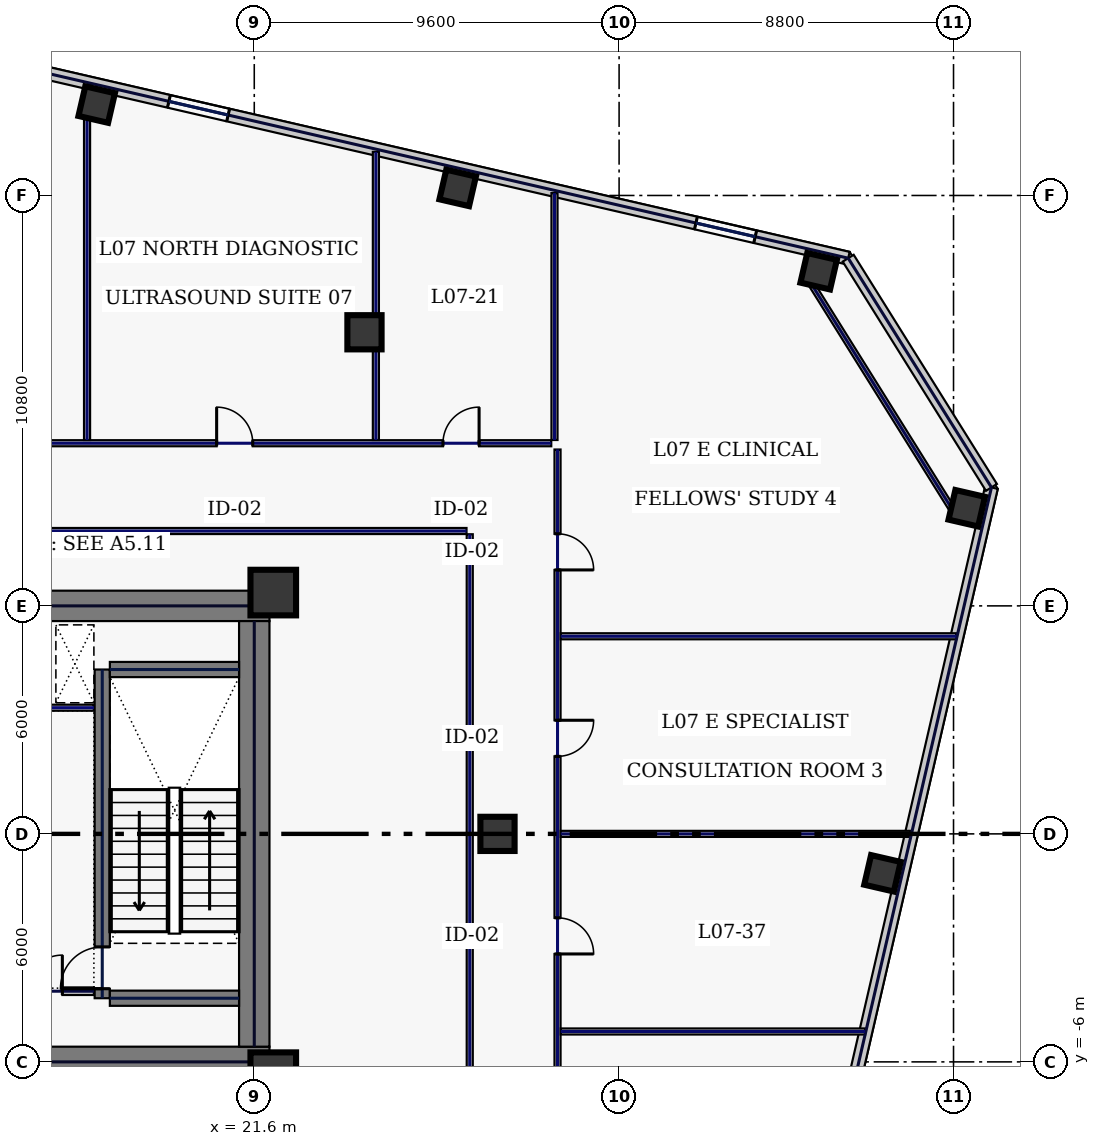
"""IFC4 building model, lengths in metres.
Left out: names, types, materials, properties, quantities, classifications, styles, units other than length and angle.
Written with IfcOpenShell. Run it as: python <this file> out.ifc"""

import sys

from ifc_helpers import new_model, si_unit, direction, frame, frame_2d, origin, origin_2d, place, context, subcontext, project, spatial, rectangle, hollow_rectangle, extrude, element, fill, save


model = new_model("IFC4")
c1 = context("Model", 3, precision=1e-05, world=origin(), true_north=direction((0.0, 1.0)))
c2 = subcontext(c1, "Body", "Model", "MODEL_VIEW")
j1 = project(units=[si_unit("LENGTHUNIT", "METRE"), si_unit("PLANEANGLEUNIT", "RADIAN")], contexts=[c1])
p1 = place(None, origin())
s1 = spatial("IfcSite", under=j1, at=p1, CompositionType="ELEMENT")
p2 = place(p1, origin())
s2 = spatial("IfcBuilding", under=s1, at=p2, CompositionType="ELEMENT")
p3 = place(p2, frame((0.0, 0.0, 39.4)))
s3 = spatial("IfcBuildingStorey", under=s2, at=p3, CompositionType="ELEMENT", Elevation=39.4)
for number, where, z_axis, x_axis in (
    (1, (10.4, 6.0, 0.0), (0.0, 0.0, 1.0), (1.0, 0.0, 0.0)),
    (2, (10.4, -6.0, 0.0), (0.0, 0.0, 1.0), (1.0, 0.0, 0.0)),
):
    element("IfcWall", number, at=place(p3, frame(where, z_axis=z_axis, x_axis=x_axis)), inside=s3, PredefinedType="SHEAR", context=c2, shape_type="SweptSolid", body=[
        extrude(rectangle(XDim=11.6, YDim=0.8, at=frame_2d((5.8, 0.0))), origin(), (0.0, 0.0, 1.0), 3.74),
    ])
p4 = place(p3, frame((21.6, -5.6, 0.0), z_axis=(0.0, 0.0, 1.0), x_axis=(0.0, 1.0, 0.0)))
e3 = element("IfcWall", 3, at=p4, inside=s3, PredefinedType="SHEAR", context=c2, shape_type="SweptSolid", body=[
    extrude(rectangle(XDim=11.2, YDim=0.8, at=frame_2d((5.6, 0.0))), origin(), (0.0, 0.0, 1.0), 3.74),
])
p5 = place(p3, frame((17.6, -4.325, 0.0), z_axis=(0.0, 0.0, 1.0), x_axis=(0.0, 1.0, 0.0)))
e4 = element("IfcWall", 4, at=p5, inside=s3, PredefinedType="SHEAR", context=c2, shape_type="SweptSolid", body=[
    extrude(rectangle(XDim=8.65, YDim=0.4, at=frame_2d((4.325, 0.0))), origin(), (0.0, 0.0, 1.0), 3.74),
])
p6 = place(p5, frame((0.25, 0.0, 0.0)))
e5 = element("IfcOpeningElement", 5, at=p6, cuts=e4, PredefinedType="OPENING", context=c2, shape_type="SweptSolid", body=[
    extrude(rectangle(XDim=1.1, YDim=2.2, at=frame_2d((0.55, 1.1))), frame((0.0, 0.21, 0.0), z_axis=(0.0, -1.0, 0.0), x_axis=(1.0, 0.0, 0.0)), (0.0, 0.0, 1.0), 0.42),
])
for number, where, z_axis, x_axis in (
    (6, (17.8, -4.325, 0.0), (0.0, 0.0, 1.0), (1.0, 0.0, 0.0)),
    (7, (17.8, 4.325, 0.0), (0.0, 0.0, 1.0), (1.0, 0.0, 0.0)),
):
    element("IfcWall", number, at=place(p3, frame(where, z_axis=z_axis, x_axis=x_axis)), inside=s3, PredefinedType="SHEAR", context=c2, shape_type="SweptSolid", body=[
        extrude(rectangle(XDim=3.4, YDim=0.4, at=frame_2d((1.7, 0.0))), origin(), (0.0, 0.0, 1.0), 3.74),
    ])
for number, where, z_axis, x_axis in (
    (8, (22.1, -6.35, 0.0), (0.0, 0.0, 1.0), (1.0, 0.0, 0.0)),
    (9, (22.1, 6.35, 0.0), (0.0, 0.0, 1.0), (1.0, 0.0, 0.0)),
):
    element("IfcColumn", number, at=place(p3, frame(where, z_axis=z_axis, x_axis=x_axis)), inside=s3, PredefinedType="COLUMN", context=c2, shape_type="SweptSolid", body=[
        extrude(hollow_rectangle(XDim=1.2, YDim=1.2, WallThickness=0.05, at=origin_2d()), origin(), (0.0, 0.0, 1.0), 3.74),
    ])
for number, where, z_axis, x_axis in (
    (10, (24.5, 13.2, 0.0), (0.0, 0.0, 1.0), (1.0, 0.0, 0.0)),
    (11, (28.0, 0.0, 0.0), (0.0, 0.0, 1.0), (1.0, 0.0, 0.0)),
):
    element("IfcColumn", number, at=place(p3, frame(where, z_axis=z_axis, x_axis=x_axis)), inside=s3, PredefinedType="COLUMN", context=c2, shape_type="SweptSolid", body=[
        extrude(hollow_rectangle(XDim=0.9, YDim=0.9, WallThickness=0.04, at=origin_2d()), origin(), (0.0, 0.0, 1.0), 3.74),
    ])
for number, where, z_axis, x_axis in (
    (12, (36.451, 14.806, 0.0), (0.0, 0.0, 1.0), (0.974, -0.225, 0.0)),
    (13, (26.952, 16.999, 0.0), (0.0, 0.0, 1.0), (0.974, -0.225, 0.0)),
    (14, (17.454, 19.192, 0.0), (0.0, 0.0, 1.0), (0.974, -0.225, 0.0)),
    (15, (38.13, -1.038, 0.0), (0.0, 0.0, 1.0), (0.974, -0.225, 0.0)),
    (16, (40.348, 8.57, 0.0), (0.0, 0.0, 1.0), (0.974, -0.225, 0.0)),
):
    element("IfcColumn", number, at=place(p3, frame(where, z_axis=z_axis, x_axis=x_axis)), inside=s3, PredefinedType="COLUMN", context=c2, shape_type="SweptSolid", body=[
        extrude(hollow_rectangle(XDim=0.8, YDim=0.8, WallThickness=0.036, at=origin_2d()), origin(), (0.0, 0.0, 1.0), 3.74),
    ])
p7 = place(p3, frame((37.229, 15.15, 0.0), z_axis=(0.0, 0.0, 1.0), x_axis=(-0.97436993772, 0.224951604723, 0.0)))
e17 = element("IfcWall", 17, at=p7, inside=s3, PredefinedType="STANDARD", context=c2, shape_type="SweptSolid", body=[
    extrude(rectangle(XDim=22.651, YDim=0.34, at=frame_2d((11.326, 0.0))), origin(), (0.0, 0.0, 1.0), 3.74),
])
p8 = place(p7, frame((16.745, 0.0, 0.22)))
e18 = element("IfcOpeningElement", 18, at=p8, cuts=e17, PredefinedType="OPENING", context=c2, shape_type="SweptSolid", body=[
    extrude(rectangle(XDim=1.6, YDim=1.2, at=frame_2d((0.8, 0.6))), frame((0.0, 0.18, 0.0), z_axis=(0.0, -1.0, 0.0), x_axis=(1.0, 0.0, 0.0)), (0.0, 0.0, 1.0), 0.36),
])
p9 = place(p7, frame((2.512, 0.0, 0.22)))
e19 = element("IfcOpeningElement", 19, at=p9, cuts=e17, PredefinedType="OPENING", context=c2, shape_type="SweptSolid", body=[
    extrude(rectangle(XDim=1.6, YDim=1.2, at=frame_2d((0.8, 0.6))), frame((0.0, 0.18, 0.0), z_axis=(0.0, -1.0, 0.0), x_axis=(1.0, 0.0, 0.0)), (0.0, 0.0, 1.0), 0.36),
])
p10 = place(p3, frame((31.82, -30.637, 0.0), z_axis=(0.0, 0.0, 1.0), x_axis=(0.224949969076, 0.974370315338, 0.0)))
e20 = element("IfcWall", 20, at=p10, inside=s3, PredefinedType="STANDARD", context=c2, shape_type="SweptSolid", body=[
    extrude(rectangle(XDim=40.8, YDim=0.34, at=frame_2d((20.4, 0.0))), origin(), (0.0, 0.0, 1.0), 3.74),
])
p11 = place(p10, frame((4.3, 0.0, 0.22)))
e21 = element("IfcOpeningElement", 21, at=p11, cuts=e20, PredefinedType="OPENING", context=c2, shape_type="SweptSolid", body=[
    extrude(rectangle(XDim=1.6, YDim=1.2, at=frame_2d((0.8, 0.6))), frame((0.0, 0.18, 0.0), z_axis=(0.0, -1.0, 0.0), x_axis=(1.0, 0.0, 0.0)), (0.0, 0.0, 1.0), 0.36),
])
p12 = place(p10, frame((14.5, 0.0, 0.22)))
e22 = element("IfcOpeningElement", 22, at=p12, cuts=e20, PredefinedType="OPENING", context=c2, shape_type="SweptSolid", body=[
    extrude(rectangle(XDim=1.6, YDim=1.2, at=frame_2d((0.8, 0.6))), frame((0.0, 0.18, 0.0), z_axis=(0.0, -1.0, 0.0), x_axis=(1.0, 0.0, 0.0)), (0.0, 0.0, 1.0), 0.36),
])
p13 = place(p3, frame((40.998, 9.117, 0.0), z_axis=(0.0, 0.0, 1.0), x_axis=(-0.529921811158, 0.848046504656, 0.0)))
e23 = element("IfcWall", 23, at=p13, inside=s3, PredefinedType="STANDARD", context=c2, shape_type="SweptSolid", body=[
    extrude(rectangle(XDim=7.113, YDim=0.34, at=frame_2d((3.557, 0.0))), origin(), (0.0, 0.0, 1.0), 3.74),
])
p14 = place(p3, frame((15.725, 3.32, 0.0), z_axis=(0.0, 0.0, 1.0), x_axis=(1.0, 0.0, 0.0)))
e24 = element("IfcWall", 24, at=p14, inside=s3, PredefinedType="PARTITIONING", context=c2, shape_type="SweptSolid", body=[
    extrude(rectangle(XDim=1.655, YDim=0.16, at=frame_2d((0.827, 0.0))), origin(), (0.0, 0.0, 1.0), 3.74),
])
p15 = place(p3, frame((14.72, -4.14, 0.0), z_axis=(0.0, 0.0, 1.0), x_axis=(1.0, 0.0, 0.0)))
e25 = element("IfcWall", 25, at=p15, inside=s3, PredefinedType="SOLIDWALL", context=c2, shape_type="SweptSolid", body=[
    extrude(rectangle(XDim=2.66, YDim=0.2, at=frame_2d((1.33, 0.0))), origin(), (0.0, 0.0, 1.0), 3.74),
])
p16 = place(p15, frame((0.88, 0.0, 0.0)))
e26 = element("IfcOpeningElement", 26, at=p16, cuts=e25, PredefinedType="OPENING", context=c2, shape_type="SweptSolid", body=[
    extrude(rectangle(XDim=0.95, YDim=2.2, at=frame_2d((0.475, 1.1))), frame((0.0, 0.11, 0.0), z_axis=(0.0, -1.0, 0.0), x_axis=(1.0, 0.0, 0.0)), (0.0, 0.0, 1.0), 0.22),
])
p17 = place(p3, frame((40.06, 8.389, 0.0), z_axis=(0.0, 0.0, 1.0), x_axis=(-0.529927317139, 0.848043064089, 0.0)))
e27 = element("IfcWall", 27, at=p17, inside=s3, PredefinedType="PARTITIONING", context=c2, shape_type="SweptSolid", body=[
    extrude(rectangle(XDim=7.354, YDim=0.16, at=frame_2d((3.677, 0.0))), origin(), (0.0, 0.0, 1.0), 1.535),
])
p18 = place(p3, frame((-29.415, 10.28, 0.0), z_axis=(0.0, 0.0, 1.0), x_axis=(1.0, 0.0, 0.0)))
e28 = element("IfcWall", 28, at=p18, inside=s3, PredefinedType="PARTITIONING", context=c2, shape_type="SweptSolid", body=[
    extrude(rectangle(XDim=58.83, YDim=0.16, at=frame_2d((29.415, 0.0))), origin(), (0.0, 0.0, 1.0), 3.74),
])
p19 = place(p18, frame((2.044, 0.0, 0.0)))
e29 = element("IfcOpeningElement", 29, at=p19, cuts=e28, PredefinedType="OPENING", context=c2, shape_type="SweptSolid", body=[
    extrude(rectangle(XDim=0.95, YDim=2.2, at=frame_2d((0.475, 1.1))), frame((0.0, 0.09, 0.0), z_axis=(0.0, -1.0, 0.0), x_axis=(1.0, 0.0, 0.0)), (0.0, 0.0, 1.0), 0.18),
])
p20 = place(p18, frame((6.647, 0.0, 0.0)))
e30 = element("IfcOpeningElement", 30, at=p20, cuts=e28, PredefinedType="OPENING", context=c2, shape_type="SweptSolid", body=[
    extrude(rectangle(XDim=1.3, YDim=2.2, at=frame_2d((0.65, 1.1))), frame((0.0, 0.09, 0.0), z_axis=(0.0, -1.0, 0.0), x_axis=(1.0, 0.0, 0.0)), (0.0, 0.0, 1.0), 0.18),
])
p21 = place(p18, frame((11.492, 0.0, 0.0)))
e31 = element("IfcOpeningElement", 31, at=p21, cuts=e28, PredefinedType="OPENING", context=c2, shape_type="SweptSolid", body=[
    extrude(rectangle(XDim=1.3, YDim=2.2, at=frame_2d((0.65, 1.1))), frame((0.0, 0.09, 0.0), z_axis=(0.0, -1.0, 0.0), x_axis=(1.0, 0.0, 0.0)), (0.0, 0.0, 1.0), 0.18),
])
p22 = place(p18, frame((16.555, 0.0, 0.0)))
e32 = element("IfcOpeningElement", 32, at=p22, cuts=e28, PredefinedType="OPENING", context=c2, shape_type="SweptSolid", body=[
    extrude(rectangle(XDim=1.3, YDim=2.2, at=frame_2d((0.65, 1.1))), frame((0.0, 0.09, 0.0), z_axis=(0.0, -1.0, 0.0), x_axis=(1.0, 0.0, 0.0)), (0.0, 0.0, 1.0), 0.18),
])
p23 = place(p18, frame((22.01, 0.0, 0.0)))
e33 = element("IfcOpeningElement", 33, at=p23, cuts=e28, PredefinedType="OPENING", context=c2, shape_type="SweptSolid", body=[
    extrude(rectangle(XDim=0.95, YDim=2.2, at=frame_2d((0.475, 1.1))), frame((0.0, 0.09, 0.0), z_axis=(0.0, -1.0, 0.0), x_axis=(1.0, 0.0, 0.0)), (0.0, 0.0, 1.0), 0.18),
])
p24 = place(p18, frame((26.58, 0.0, 0.0)))
e34 = element("IfcOpeningElement", 34, at=p24, cuts=e28, PredefinedType="OPENING", context=c2, shape_type="SweptSolid", body=[
    extrude(rectangle(XDim=0.95, YDim=2.2, at=frame_2d((0.475, 1.1))), frame((0.0, 0.09, 0.0), z_axis=(0.0, -1.0, 0.0), x_axis=(1.0, 0.0, 0.0)), (0.0, 0.0, 1.0), 0.18),
])
p25 = place(p18, frame((32.435, 0.0, 0.0)))
e35 = element("IfcOpeningElement", 35, at=p25, cuts=e28, PredefinedType="OPENING", context=c2, shape_type="SweptSolid", body=[
    extrude(rectangle(XDim=0.95, YDim=2.2, at=frame_2d((0.475, 1.1))), frame((0.0, 0.09, 0.0), z_axis=(0.0, -1.0, 0.0), x_axis=(1.0, 0.0, 0.0)), (0.0, 0.0, 1.0), 0.18),
])
p26 = place(p18, frame((41.18, 0.0, 0.0)))
e36 = element("IfcOpeningElement", 36, at=p26, cuts=e28, PredefinedType="OPENING", context=c2, shape_type="SweptSolid", body=[
    extrude(rectangle(XDim=1.05, YDim=2.2, at=frame_2d((0.525, 1.1))), frame((0.0, 0.09, 0.0), z_axis=(0.0, -1.0, 0.0), x_axis=(1.0, 0.0, 0.0)), (0.0, 0.0, 1.0), 0.18),
])
p27 = place(p18, frame((50.025, 0.0, 0.0)))
e37 = element("IfcOpeningElement", 37, at=p27, cuts=e28, PredefinedType="OPENING", context=c2, shape_type="SweptSolid", body=[
    extrude(rectangle(XDim=0.95, YDim=2.2, at=frame_2d((0.475, 1.1))), frame((0.0, 0.09, 0.0), z_axis=(0.0, -1.0, 0.0), x_axis=(1.0, 0.0, 0.0)), (0.0, 0.0, 1.0), 0.18),
])
p28 = place(p18, frame((55.981, 0.0, 0.0)))
e38 = element("IfcOpeningElement", 38, at=p28, cuts=e28, PredefinedType="OPENING", context=c2, shape_type="SweptSolid", body=[
    extrude(rectangle(XDim=0.95, YDim=2.2, at=frame_2d((0.475, 1.1))), frame((0.0, 0.09, 0.0), z_axis=(0.0, -1.0, 0.0), x_axis=(1.0, 0.0, 0.0)), (0.0, 0.0, 1.0), 0.18),
])
p29 = place(p3, frame((29.58, 10.115, 0.0), z_axis=(0.0, 0.0, 1.0), x_axis=(0.0, -1.0, 0.0)))
e39 = element("IfcWall", 39, at=p29, inside=s3, PredefinedType="PARTITIONING", context=c2, shape_type="SweptSolid", body=[
    extrude(rectangle(XDim=20.13, YDim=0.16, at=frame_2d((10.065, 0.0))), origin(), (0.0, 0.0, 1.0), 3.74),
])
p30 = place(p29, frame((17.181, 0.0, 0.0)))
e40 = element("IfcOpeningElement", 40, at=p30, cuts=e39, PredefinedType="OPENING", context=c2, shape_type="SweptSolid", body=[
    extrude(rectangle(XDim=0.95, YDim=2.2, at=frame_2d((0.475, 1.1))), frame((0.0, 0.09, 0.0), z_axis=(0.0, -1.0, 0.0), x_axis=(1.0, 0.0, 0.0)), (0.0, 0.0, 1.0), 0.18),
])
p31 = place(p29, frame((12.325, 0.0, 0.0)))
e41 = element("IfcOpeningElement", 41, at=p31, cuts=e39, PredefinedType="OPENING", context=c2, shape_type="SweptSolid", body=[
    extrude(rectangle(XDim=0.95, YDim=2.2, at=frame_2d((0.475, 1.1))), frame((0.0, 0.09, 0.0), z_axis=(0.0, -1.0, 0.0), x_axis=(1.0, 0.0, 0.0)), (0.0, 0.0, 1.0), 0.18),
])
p32 = place(p29, frame((7.125, 0.0, 0.0)))
e42 = element("IfcOpeningElement", 42, at=p32, cuts=e39, PredefinedType="OPENING", context=c2, shape_type="SweptSolid", body=[
    extrude(rectangle(XDim=0.95, YDim=2.2, at=frame_2d((0.475, 1.1))), frame((0.0, 0.09, 0.0), z_axis=(0.0, -1.0, 0.0), x_axis=(1.0, 0.0, 0.0)), (0.0, 0.0, 1.0), 0.18),
])
p33 = place(p29, frame((2.219, 0.0, 0.0)))
e43 = element("IfcOpeningElement", 43, at=p33, cuts=e39, PredefinedType="OPENING", context=c2, shape_type="SweptSolid", body=[
    extrude(rectangle(XDim=0.95, YDim=2.2, at=frame_2d((0.475, 1.1))), frame((0.0, 0.09, 0.0), z_axis=(0.0, -1.0, 0.0), x_axis=(1.0, 0.0, 0.0)), (0.0, 0.0, 1.0), 0.18),
])
p34 = place(p3, frame((27.185, 7.97, 0.0), z_axis=(0.0, 0.0, 1.0), x_axis=(-1.0, 0.0, 0.0)))
e44 = element("IfcWall", 44, at=p34, inside=s3, PredefinedType="PARTITIONING", context=c2, shape_type="SweptSolid", body=[
    extrude(rectangle(XDim=16.52, YDim=0.16, at=frame_2d((8.26, 0.0))), origin(), (0.0, 0.0, 1.0), 3.74),
])
p35 = place(p3, frame((27.27, -7.785, 0.0), z_axis=(0.0, 0.0, 1.0), x_axis=(0.0, 1.0, 0.0)))
e45 = element("IfcWall", 45, at=p35, inside=s3, PredefinedType="PARTITIONING", context=c2, shape_type="SweptSolid", body=[
    extrude(rectangle(XDim=15.67, YDim=0.16, at=frame_2d((7.835, 0.0))), origin(), (0.0, 0.0, 1.0), 3.74),
])
p36 = place(p3, frame((29.5, 10.365, 0.0), z_axis=(0.0, 0.0, 1.0), x_axis=(0.0, 1.0, 0.0)))
e46 = element("IfcWall", 46, at=p36, inside=s3, PredefinedType="PARTITIONING", context=c2, shape_type="SweptSolid", body=[
    extrude(rectangle(XDim=6.497, YDim=0.16, at=frame_2d((3.249, 0.0))), origin(), (0.0, 0.0, 1.0), 3.74),
])
p37 = place(p3, frame((17.2, 10.365, 0.0), z_axis=(0.0, 0.0, 1.0), x_axis=(0.0, 1.0, 0.0)))
e47 = element("IfcWall", 47, at=p37, inside=s3, PredefinedType="PARTITIONING", context=c2, shape_type="SweptSolid", body=[
    extrude(rectangle(XDim=9.337, YDim=0.16, at=frame_2d((4.668, 0.0))), origin(), (0.0, 0.0, 1.0), 3.74),
])
p38 = place(p3, frame((24.8, 10.365, 0.0), z_axis=(0.0, 0.0, 1.0), x_axis=(0.0, 1.0, 0.0)))
e48 = element("IfcWall", 48, at=p38, inside=s3, PredefinedType="PARTITIONING", context=c2, shape_type="SweptSolid", body=[
    extrude(rectangle(XDim=7.583, YDim=0.16, at=frame_2d((3.791, 0.0))), origin(), (0.0, 0.0, 1.0), 3.74),
])
p39 = place(p3, frame((29.665, -5.2, 0.0), z_axis=(0.0, 0.0, 1.0), x_axis=(1.0, 0.0, 0.0)))
e49 = element("IfcWall", 49, at=p39, inside=s3, PredefinedType="PARTITIONING", context=c2, shape_type="SweptSolid", body=[
    extrude(rectangle(XDim=8.007, YDim=0.16, at=frame_2d((4.003, 0.0))), origin(), (0.0, 0.0, 1.0), 3.74),
])
p40 = place(p3, frame((29.665, 0.0, 0.0), z_axis=(0.0, 0.0, 1.0), x_axis=(1.0, 0.0, 0.0)))
e50 = element("IfcWall", 50, at=p40, inside=s3, PredefinedType="PARTITIONING", context=c2, shape_type="SweptSolid", body=[
    extrude(rectangle(XDim=9.208, YDim=0.16, at=frame_2d((4.604, 0.0))), origin(), (0.0, 0.0, 1.0), 3.235),
])
p41 = place(p3, frame((29.665, 5.2, 0.0), z_axis=(0.0, 0.0, 1.0), x_axis=(1.0, 0.0, 0.0)))
e51 = element("IfcWall", 51, at=p41, inside=s3, PredefinedType="PARTITIONING", context=c2, shape_type="SweptSolid", body=[
    extrude(rectangle(XDim=10.408, YDim=0.16, at=frame_2d((5.204, 0.0))), origin(), (0.0, 0.0, 1.0), 3.74),
])
p42 = place(p8, origin())
e52 = element("IfcWindow", 52, at=p42, inside=s3, PartitioningType="SINGLE_PANEL", PredefinedType="WINDOW", context=c2, shape_type="SweptSolid", body=[
    extrude(rectangle(XDim=1.6, YDim=1.2, at=frame_2d((0.8, 0.6))), frame((0.0, 0.03, 0.0), z_axis=(0.0, -1.0, 0.0), x_axis=(1.0, 0.0, 0.0)), (0.0, 0.0, 1.0), 0.06),
])
fill(e18, e52)
p43 = place(p9, origin())
e53 = element("IfcWindow", 53, at=p43, inside=s3, PartitioningType="SINGLE_PANEL", PredefinedType="WINDOW", context=c2, shape_type="SweptSolid", body=[
    extrude(rectangle(XDim=1.6, YDim=1.2, at=frame_2d((0.8, 0.6))), frame((0.0, 0.03, 0.0), z_axis=(0.0, -1.0, 0.0), x_axis=(1.0, 0.0, 0.0)), (0.0, 0.0, 1.0), 0.06),
])
fill(e19, e53)
p44 = place(p6, origin())
e54 = element("IfcDoor", 54, at=p44, inside=s3, OperationType="SINGLE_SWING_LEFT", PredefinedType="DOOR", context=c2, shape_type="SweptSolid", body=[
    extrude(rectangle(XDim=1.1, YDim=2.2, at=frame_2d((0.55, 1.1))), frame((0.0, 0.025, 0.0), z_axis=(0.0, -1.0, 0.0), x_axis=(1.0, 0.0, 0.0)), (0.0, 0.0, 1.0), 0.05),
])
fill(e5, e54)
p45 = place(p16, origin())
e55 = element("IfcDoor", 55, at=p45, inside=s3, OperationType="SINGLE_SWING_RIGHT", PredefinedType="DOOR", context=c2, shape_type="SweptSolid", body=[
    extrude(rectangle(XDim=0.95, YDim=2.2, at=frame_2d((0.475, 1.1))), frame((0.0, 0.025, 0.0), z_axis=(0.0, -1.0, 0.0), x_axis=(1.0, 0.0, 0.0)), (0.0, 0.0, 1.0), 0.05),
])
fill(e26, e55)
p46 = place(p27, origin())
e56 = element("IfcDoor", 56, at=p46, inside=s3, OperationType="SINGLE_SWING_LEFT", PredefinedType="DOOR", context=c2, shape_type="SweptSolid", body=[
    extrude(rectangle(XDim=0.95, YDim=2.2, at=frame_2d((0.475, 1.1))), frame((0.0, 0.025, 0.0), z_axis=(0.0, -1.0, 0.0), x_axis=(1.0, 0.0, 0.0)), (0.0, 0.0, 1.0), 0.05),
])
fill(e37, e56)
p47 = place(p28, origin())
e57 = element("IfcDoor", 57, at=p47, inside=s3, OperationType="SINGLE_SWING_RIGHT", PredefinedType="DOOR", context=c2, shape_type="SweptSolid", body=[
    extrude(rectangle(XDim=0.95, YDim=2.2, at=frame_2d((0.475, 1.1))), frame((0.0, 0.025, 0.0), z_axis=(0.0, -1.0, 0.0), x_axis=(1.0, 0.0, 0.0)), (0.0, 0.0, 1.0), 0.05),
])
fill(e38, e57)
p48 = place(p31, origin())
e58 = element("IfcDoor", 58, at=p48, inside=s3, OperationType="SINGLE_SWING_RIGHT", PredefinedType="DOOR", context=c2, shape_type="SweptSolid", body=[
    extrude(rectangle(XDim=0.95, YDim=2.2, at=frame_2d((0.475, 1.1))), frame((0.0, 0.025, 0.0), z_axis=(0.0, -1.0, 0.0), x_axis=(1.0, 0.0, 0.0)), (0.0, 0.0, 1.0), 0.05),
])
fill(e41, e58)
p49 = place(p32, origin())
e59 = element("IfcDoor", 59, at=p49, inside=s3, OperationType="SINGLE_SWING_LEFT", PredefinedType="DOOR", context=c2, shape_type="SweptSolid", body=[
    extrude(rectangle(XDim=0.95, YDim=2.2, at=frame_2d((0.475, 1.1))), frame((0.0, 0.025, 0.0), z_axis=(0.0, -1.0, 0.0), x_axis=(1.0, 0.0, 0.0)), (0.0, 0.0, 1.0), 0.05),
])
fill(e42, e59)
p50 = place(p33, origin())
e60 = element("IfcDoor", 60, at=p50, inside=s3, OperationType="SINGLE_SWING_RIGHT", PredefinedType="DOOR", context=c2, shape_type="SweptSolid", body=[
    extrude(rectangle(XDim=0.95, YDim=2.2, at=frame_2d((0.475, 1.1))), frame((0.0, 0.025, 0.0), z_axis=(0.0, -1.0, 0.0), x_axis=(1.0, 0.0, 0.0)), (0.0, 0.0, 1.0), 0.05),
])
fill(e43, e60)
save(model, sys.argv[1])
